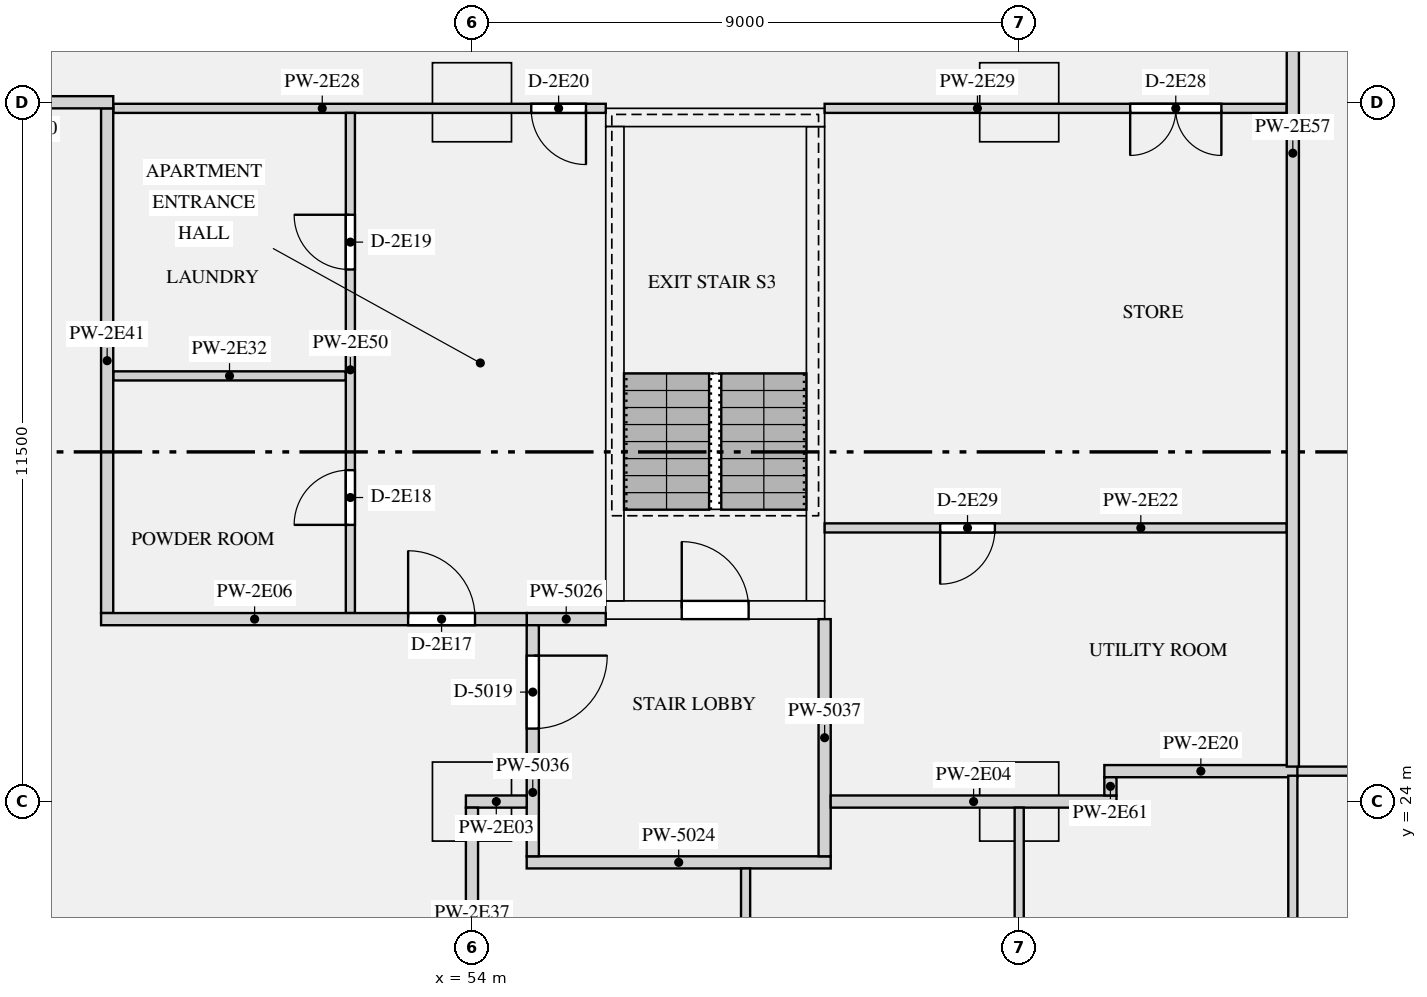
"""IFC4 building model, lengths in metres.
Left out: names, types, materials, properties, quantities, classifications, styles, units other than length and angle.
Written with IfcOpenShell. Run it as: python <this file> out.ifc"""

import sys

from ifc_helpers import new_model, si_unit, direction, frame, frame_2d, origin, origin_2d, place, context, subcontext, project, spatial, rectangle, extrude, element, fill, save


model = new_model("IFC4")
c1 = context("Model", 3, precision=1e-05, world=origin(), true_north=direction((0.0, 1.0)))
c2 = subcontext(c1, "Body", "Model", "MODEL_VIEW")
j1 = project(units=[si_unit("LENGTHUNIT", "METRE"), si_unit("PLANEANGLEUNIT", "RADIAN")], contexts=[c1])
p1 = place(None, origin())
s1 = spatial("IfcSite", under=j1, at=p1, CompositionType="ELEMENT")
p2 = place(p1, origin())
s2 = spatial("IfcBuilding", under=s1, at=p2, CompositionType="ELEMENT")
p3 = place(p2, frame((0.0, 0.0, 118.2)))
s3 = spatial("IfcBuildingStorey", under=s2, at=p3, CompositionType="ELEMENT", Elevation=118.2)
for number, where, z_axis, x_axis in (
    (1, (54.0, 24.0, 0.0), (0.0, 0.0, 1.0), (1.0, 0.0, 0.0)),
    (2, (63.0, 24.0, 0.0), (0.0, 0.0, 1.0), (1.0, 0.0, 0.0)),
    (3, (54.0, 35.5, 0.0), (0.0, 0.0, 1.0), (1.0, 0.0, 0.0)),
    (4, (63.0, 35.5, 0.0), (0.0, 0.0, 1.0), (1.0, 0.0, 0.0)),
):
    element("IfcColumn", number, at=place(p3, frame(where, z_axis=z_axis, x_axis=x_axis)), inside=s3, PredefinedType="COLUMN", context=c2, shape_type="SweptSolid", body=[
        extrude(rectangle(XDim=1.3, YDim=1.3, at=origin_2d()), origin(), (0.0, 0.0, 1.0), 3.15),
    ])
p4 = place(p3, frame((56.2, 27.15, 0.0), z_axis=(0.0, 0.0, 1.0), x_axis=(1.0, 0.0, 0.0)))
e5 = element("IfcWall", 5, at=p4, inside=s3, PredefinedType="SHEAR", context=c2, shape_type="SweptSolid", body=[
    extrude(rectangle(XDim=3.6, YDim=0.3, at=frame_2d((1.8, 0.0))), origin(), (0.0, 0.0, 1.0), 3.15),
])
p5 = place(p4, frame((1.25, 0.0, 0.0)))
e6 = element("IfcOpeningElement", 6, at=p5, cuts=e5, PredefinedType="OPENING", context=c2, shape_type="SweptSolid", body=[
    extrude(rectangle(XDim=1.1, YDim=2.1, at=frame_2d((0.55, 1.05))), frame((0.0, 0.16, 0.0), z_axis=(0.0, -1.0, 0.0), x_axis=(1.0, 0.0, 0.0)), (0.0, 0.0, 1.0), 0.32),
])
p6 = place(p3, frame((56.2, 35.25, 0.0), z_axis=(0.0, 0.0, 1.0), x_axis=(1.0, 0.0, 0.0)))
e7 = element("IfcWall", 7, at=p6, inside=s3, PredefinedType="SHEAR", context=c2, shape_type="SweptSolid", body=[
    extrude(rectangle(XDim=3.6, YDim=0.3, at=frame_2d((1.8, 0.0))), origin(), (0.0, 0.0, 1.0), 3.15),
])
for number, where, z_axis, x_axis in (
    (8, (56.35, 27.3, 0.0), (0.0, 0.0, 1.0), (0.0, 1.0, 0.0)),
    (9, (59.65, 27.3, 0.0), (0.0, 0.0, 1.0), (0.0, 1.0, 0.0)),
):
    element("IfcWall", number, at=place(p3, frame(where, z_axis=z_axis, x_axis=x_axis)), inside=s3, PredefinedType="SHEAR", context=c2, shape_type="SweptSolid", body=[
        extrude(rectangle(XDim=7.8, YDim=0.3, at=frame_2d((3.9, 0.0))), origin(), (0.0, 0.0, 1.0), 3.15),
    ])
p7 = place(p3, frame((54.9, 23.0, 0.0), z_axis=(0.0, 0.0, 1.0), x_axis=(1.0, 0.0, 0.0)))
e10 = element("IfcWall", 10, at=p7, inside=s3, PredefinedType="PARTITIONING", context=c2, shape_type="SweptSolid", body=[
    extrude(rectangle(XDim=5.0, YDim=0.2, at=frame_2d((2.5, 0.0))), origin(), (0.0, 0.0, 1.0), 2.83),
])
p8 = place(p3, frame((54.9, 27.0, 0.0), z_axis=(0.0, 0.0, 1.0), x_axis=(1.0, 0.0, 0.0)))
e11 = element("IfcWall", 11, at=p8, inside=s3, PredefinedType="PARTITIONING", context=c2, shape_type="SweptSolid", body=[
    extrude(rectangle(XDim=1.3, YDim=0.2, at=frame_2d((0.65, 0.0))), origin(), (0.0, 0.0, 1.0), 2.83),
])
p9 = place(p3, frame((55.0, 23.1, 0.0), z_axis=(0.0, 0.0, 1.0), x_axis=(0.0, 1.0, 0.0)))
e12 = element("IfcWall", 12, at=p9, inside=s3, PredefinedType="PARTITIONING", context=c2, shape_type="SweptSolid", body=[
    extrude(rectangle(XDim=3.8, YDim=0.2, at=frame_2d((1.9, 0.0))), origin(), (0.0, 0.0, 1.0), 2.83),
])
p10 = place(p9, frame((2.1, 0.0, 0.0)))
e13 = element("IfcOpeningElement", 13, at=p10, cuts=e12, PredefinedType="OPENING", context=c2, shape_type="SweptSolid", body=[
    extrude(rectangle(XDim=1.2, YDim=2.1, at=frame_2d((0.6, 1.05))), frame((0.0, 0.11, 0.0), z_axis=(0.0, -1.0, 0.0), x_axis=(1.0, 0.0, 0.0)), (0.0, 0.0, 1.0), 0.22),
])
p11 = place(p3, frame((59.8, 23.1, 0.0), z_axis=(0.0, 0.0, 1.0), x_axis=(0.0, 1.0, 0.0)))
e14 = element("IfcWall", 14, at=p11, inside=s3, PredefinedType="PARTITIONING", context=c2, shape_type="SweptSolid", body=[
    extrude(rectangle(XDim=3.9, YDim=0.2, at=frame_2d((1.95, 0.0))), origin(), (0.0, 0.0, 1.0), 2.83),
])
p12 = place(p3, frame((53.9, 24.0, 0.0), z_axis=(0.0, 0.0, 1.0), x_axis=(1.0, 0.0, 0.0)))
e15 = element("IfcWall", 15, at=p12, inside=s3, PredefinedType="PARTITIONING", context=c2, shape_type="SweptSolid", body=[
    extrude(rectangle(XDim=1.0, YDim=0.2, at=frame_2d((0.5, 0.0))), origin(), (0.0, 0.0, 1.0), 2.83),
])
p13 = place(p3, frame((59.9, 24.0, 0.0), z_axis=(0.0, 0.0, 1.0), x_axis=(1.0, 0.0, 0.0)))
e16 = element("IfcWall", 16, at=p13, inside=s3, PredefinedType="PARTITIONING", context=c2, shape_type="SweptSolid", body=[
    extrude(rectangle(XDim=4.7, YDim=0.2, at=frame_2d((2.35, 0.0))), origin(), (0.0, 0.0, 1.0), 2.83),
])
p14 = place(p3, frame((47.9, 27.0, 0.0), z_axis=(0.0, 0.0, 1.0), x_axis=(1.0, 0.0, 0.0)))
e17 = element("IfcWall", 17, at=p14, inside=s3, PredefinedType="PARTITIONING", context=c2, shape_type="SweptSolid", body=[
    extrude(rectangle(XDim=7.0, YDim=0.2, at=frame_2d((3.5, 0.0))), origin(), (0.0, 0.0, 1.0), 2.83),
])
p15 = place(p14, frame((5.05, 0.0, 0.0)))
e18 = element("IfcOpeningElement", 18, at=p15, cuts=e17, PredefinedType="OPENING", context=c2, shape_type="SweptSolid", body=[
    extrude(rectangle(XDim=1.1, YDim=2.1, at=frame_2d((0.55, 1.05))), frame((0.0, 0.11, 0.0), z_axis=(0.0, -1.0, 0.0), x_axis=(1.0, 0.0, 0.0)), (0.0, 0.0, 1.0), 0.22),
])
p16 = place(p3, frame((45.0, 35.5, 0.0), z_axis=(0.0, 0.0, 1.0), x_axis=(1.0, 0.0, 0.0)))
e19 = element("IfcWall", 19, at=p16, inside=s3, PredefinedType="PARTITIONING", context=c2, shape_type="SweptSolid", body=[
    extrude(rectangle(XDim=3.1, YDim=0.2, at=frame_2d((1.55, 0.0))), origin(), (0.0, 0.0, 1.0), 2.83),
])
p17 = place(p3, frame((67.425, 24.5, 0.0), z_axis=(0.0, 0.0, 1.0), x_axis=(1.0, 0.0, 0.0)))
e20 = element("IfcWall", 20, at=p17, inside=s3, PredefinedType="PARTITIONING", context=c2, shape_type="SweptSolid", body=[
    extrude(rectangle(XDim=4.65, YDim=0.15, at=frame_2d((2.325, 0.0))), origin(), (0.0, 0.0, 1.0), 2.83),
])
p18 = place(p17, frame((1.25, 0.0, 0.0)))
e21 = element("IfcOpeningElement", 21, at=p18, cuts=e20, PredefinedType="OPENING", context=c2, shape_type="SweptSolid", body=[
    extrude(rectangle(XDim=1.5, YDim=2.1, at=frame_2d((0.75, 1.05))), frame((0.0, 0.085, 0.0), z_axis=(0.0, -1.0, 0.0), x_axis=(1.0, 0.0, 0.0)), (0.0, 0.0, 1.0), 0.17),
])
p19 = place(p3, frame((64.4, 24.5, 0.0), z_axis=(0.0, 0.0, 1.0), x_axis=(1.0, 0.0, 0.0)))
e22 = element("IfcWall", 22, at=p19, inside=s3, PredefinedType="PARTITIONING", context=c2, shape_type="SweptSolid", body=[
    extrude(rectangle(XDim=3.175, YDim=0.2, at=frame_2d((1.587, 0.0))), origin(), (0.0, 0.0, 1.0), 2.83),
])
p20 = place(p3, frame((59.8, 28.5, 0.0), z_axis=(0.0, 0.0, 1.0), x_axis=(1.0, 0.0, 0.0)))
e23 = element("IfcWall", 23, at=p20, inside=s3, PredefinedType="PARTITIONING", context=c2, shape_type="SweptSolid", body=[
    extrude(rectangle(XDim=7.6, YDim=0.15, at=frame_2d((3.8, 0.0))), origin(), (0.0, 0.0, 1.0), 2.83),
])
p21 = place(p20, frame((1.9, 0.0, 0.0)))
e24 = element("IfcOpeningElement", 24, at=p21, cuts=e23, PredefinedType="OPENING", context=c2, shape_type="SweptSolid", body=[
    extrude(rectangle(XDim=0.9, YDim=2.1, at=frame_2d((0.45, 1.05))), frame((0.0, 0.085, 0.0), z_axis=(0.0, -1.0, 0.0), x_axis=(1.0, 0.0, 0.0)), (0.0, 0.0, 1.0), 0.17),
])
p22 = place(p3, frame((48.1, 35.4, 0.0), z_axis=(0.0, 0.0, 1.0), x_axis=(1.0, 0.0, 0.0)))
e25 = element("IfcWall", 25, at=p22, inside=s3, PredefinedType="PARTITIONING", context=c2, shape_type="SweptSolid", body=[
    extrude(rectangle(XDim=8.1, YDim=0.15, at=frame_2d((4.05, 0.0))), origin(), (0.0, 0.0, 1.0), 2.83),
])
p23 = place(p22, frame((6.875, 0.0, 0.0)))
e26 = element("IfcOpeningElement", 26, at=p23, cuts=e25, PredefinedType="OPENING", context=c2, shape_type="SweptSolid", body=[
    extrude(rectangle(XDim=0.9, YDim=2.1, at=frame_2d((0.45, 1.05))), frame((0.0, 0.085, 0.0), z_axis=(0.0, -1.0, 0.0), x_axis=(1.0, 0.0, 0.0)), (0.0, 0.0, 1.0), 0.17),
])
p24 = place(p3, frame((59.8, 35.4, 0.0), z_axis=(0.0, 0.0, 1.0), x_axis=(1.0, 0.0, 0.0)))
e27 = element("IfcWall", 27, at=p24, inside=s3, PredefinedType="PARTITIONING", context=c2, shape_type="SweptSolid", body=[
    extrude(rectangle(XDim=7.6, YDim=0.15, at=frame_2d((3.8, 0.0))), origin(), (0.0, 0.0, 1.0), 2.83),
])
p25 = place(p24, frame((5.025, 0.0, 0.0)))
e28 = element("IfcOpeningElement", 28, at=p25, cuts=e27, PredefinedType="OPENING", context=c2, shape_type="SweptSolid", body=[
    extrude(rectangle(XDim=1.5, YDim=2.1, at=frame_2d((0.75, 1.05))), frame((0.0, 0.085, 0.0), z_axis=(0.0, -1.0, 0.0), x_axis=(1.0, 0.0, 0.0)), (0.0, 0.0, 1.0), 0.17),
])
p26 = place(p3, frame((48.1, 31.0, 0.0), z_axis=(0.0, 0.0, 1.0), x_axis=(1.0, 0.0, 0.0)))
e29 = element("IfcWall", 29, at=p26, inside=s3, PredefinedType="PARTITIONING", context=c2, shape_type="SweptSolid", body=[
    extrude(rectangle(XDim=3.825, YDim=0.15, at=frame_2d((1.913, 0.0))), origin(), (0.0, 0.0, 1.0), 2.83),
])
p27 = place(p3, frame((54.0, 16.1, 0.0), z_axis=(0.0, 0.0, 1.0), x_axis=(0.0, 1.0, 0.0)))
e30 = element("IfcWall", 30, at=p27, inside=s3, PredefinedType="PARTITIONING", context=c2, shape_type="SweptSolid", body=[
    extrude(rectangle(XDim=7.8, YDim=0.2, at=frame_2d((3.9, 0.0))), origin(), (0.0, 0.0, 1.0), 2.83),
])
p28 = place(p27, frame((2.35, 0.0, 0.0)))
e31 = element("IfcOpeningElement", 31, at=p28, cuts=e30, PredefinedType="OPENING", context=c2, shape_type="SweptSolid", body=[
    extrude(rectangle(XDim=1.1, YDim=2.1, at=frame_2d((0.55, 1.05))), frame((0.0, 0.11, 0.0), z_axis=(0.0, -1.0, 0.0), x_axis=(1.0, 0.0, 0.0)), (0.0, 0.0, 1.0), 0.22),
])
p29 = place(p3, frame((48.0, 27.1, 0.0), z_axis=(0.0, 0.0, 1.0), x_axis=(0.0, 1.0, 0.0)))
e32 = element("IfcWall", 32, at=p29, inside=s3, PredefinedType="PARTITIONING", context=c2, shape_type="SweptSolid", body=[
    extrude(rectangle(XDim=8.3, YDim=0.2, at=frame_2d((4.15, 0.0))), origin(), (0.0, 0.0, 1.0), 2.83),
])
p30 = place(p3, frame((52.0, 27.1, 0.0), z_axis=(0.0, 0.0, 1.0), x_axis=(0.0, 1.0, 0.0)))
e33 = element("IfcWall", 33, at=p30, inside=s3, PredefinedType="PARTITIONING", context=c2, shape_type="SweptSolid", body=[
    extrude(rectangle(XDim=8.225, YDim=0.15, at=frame_2d((4.112, 0.0))), origin(), (0.0, 0.0, 1.0), 2.83),
])
p31 = place(p30, frame((1.45, 0.0, 0.0)))
e34 = element("IfcOpeningElement", 34, at=p31, cuts=e33, PredefinedType="OPENING", context=c2, shape_type="SweptSolid", body=[
    extrude(rectangle(XDim=0.9, YDim=2.1, at=frame_2d((0.45, 1.05))), frame((0.0, 0.085, 0.0), z_axis=(0.0, -1.0, 0.0), x_axis=(1.0, 0.0, 0.0)), (0.0, 0.0, 1.0), 0.17),
])
p32 = place(p30, frame((5.65, 0.0, 0.0)))
e35 = element("IfcOpeningElement", 35, at=p32, cuts=e33, PredefinedType="OPENING", context=c2, shape_type="SweptSolid", body=[
    extrude(rectangle(XDim=0.9, YDim=2.1, at=frame_2d((0.45, 1.05))), frame((0.0, 0.085, 0.0), z_axis=(0.0, -1.0, 0.0), x_axis=(1.0, 0.0, 0.0)), (0.0, 0.0, 1.0), 0.17),
])
p33 = place(p3, frame((67.5, 16.575, 0.0), z_axis=(0.0, 0.0, 1.0), x_axis=(0.0, 1.0, 0.0)))
e36 = element("IfcWall", 36, at=p33, inside=s3, PredefinedType="PARTITIONING", context=c2, shape_type="SweptSolid", body=[
    extrude(rectangle(XDim=7.85, YDim=0.15, at=frame_2d((3.925, 0.0))), origin(), (0.0, 0.0, 1.0), 2.83),
])
p34 = place(p3, frame((67.5, 24.575, 0.0), z_axis=(0.0, 0.0, 1.0), x_axis=(0.0, 1.0, 0.0)))
e37 = element("IfcWall", 37, at=p34, inside=s3, PredefinedType="PARTITIONING", context=c2, shape_type="SweptSolid", body=[
    extrude(rectangle(XDim=20.175, YDim=0.2, at=frame_2d((10.087, 0.0))), origin(), (0.0, 0.0, 1.0), 2.83),
])
p35 = place(p3, frame((63.0, 12.575, 0.0), z_axis=(0.0, 0.0, 1.0), x_axis=(0.0, 1.0, 0.0)))
e38 = element("IfcWall", 38, at=p35, inside=s3, PredefinedType="PARTITIONING", context=c2, shape_type="SweptSolid", body=[
    extrude(rectangle(XDim=11.325, YDim=0.15, at=frame_2d((5.663, 0.0))), origin(), (0.0, 0.0, 1.0), 2.83),
])
p36 = place(p35, frame((1.8, 0.0, 0.0)))
e39 = element("IfcOpeningElement", 39, at=p36, cuts=e38, PredefinedType="OPENING", context=c2, shape_type="SweptSolid", body=[
    extrude(rectangle(XDim=0.9, YDim=2.1, at=frame_2d((0.45, 1.05))), frame((0.0, 0.085, 0.0), z_axis=(0.0, -1.0, 0.0), x_axis=(1.0, 0.0, 0.0)), (0.0, 0.0, 1.0), 0.17),
])
p37 = place(p35, frame((6.9, 0.0, 0.0)))
e40 = element("IfcOpeningElement", 40, at=p37, cuts=e38, PredefinedType="OPENING", context=c2, shape_type="SweptSolid", body=[
    extrude(rectangle(XDim=0.9, YDim=2.1, at=frame_2d((0.45, 1.05))), frame((0.0, 0.085, 0.0), z_axis=(0.0, -1.0, 0.0), x_axis=(1.0, 0.0, 0.0)), (0.0, 0.0, 1.0), 0.17),
])
p38 = place(p3, frame((64.5, 24.1, 0.0), z_axis=(0.0, 0.0, 1.0), x_axis=(0.0, 1.0, 0.0)))
e41 = element("IfcWall", 41, at=p38, inside=s3, PredefinedType="PARTITIONING", context=c2, shape_type="SweptSolid", body=[
    extrude(rectangle(XDim=0.3, YDim=0.2, at=frame_2d((0.15, 0.0))), origin(), (0.0, 0.0, 1.0), 2.83),
])
p39 = place(p3, frame((58.5, 12.575, 0.0), z_axis=(0.0, 0.0, 1.0), x_axis=(0.0, 1.0, 0.0)))
e42 = element("IfcWall", 42, at=p39, inside=s3, PredefinedType="PARTITIONING", context=c2, shape_type="SweptSolid", body=[
    extrude(rectangle(XDim=10.325, YDim=0.15, at=frame_2d((5.163, 0.0))), origin(), (0.0, 0.0, 1.0), 2.83),
])
p40 = place(p39, frame((4.75, 0.0, 0.0)))
e43 = element("IfcOpeningElement", 43, at=p40, cuts=e42, PredefinedType="OPENING", context=c2, shape_type="SweptSolid", body=[
    extrude(rectangle(XDim=0.9, YDim=2.1, at=frame_2d((0.45, 1.05))), frame((0.0, 0.085, 0.0), z_axis=(0.0, -1.0, 0.0), x_axis=(1.0, 0.0, 0.0)), (0.0, 0.0, 1.0), 0.17),
])
p41 = place(p5, origin())
e44 = element("IfcDoor", 44, at=p41, inside=s3, OperationType="SINGLE_SWING_LEFT", PredefinedType="DOOR", context=c2, shape_type="SweptSolid", body=[
    extrude(rectangle(XDim=1.1, YDim=2.1, at=frame_2d((0.55, 1.05))), frame((0.0, 0.025, 0.0), z_axis=(0.0, -1.0, 0.0), x_axis=(1.0, 0.0, 0.0)), (0.0, 0.0, 1.0), 0.05),
])
fill(e6, e44)
p42 = place(p10, frame((1.2, 0.0, 0.0), z_axis=(0.0, 0.0, 1.0), x_axis=(-1.0, 0.0, 0.0)))
e45 = element("IfcDoor", 45, at=p42, inside=s3, OperationType="SINGLE_SWING_LEFT", PredefinedType="DOOR", context=c2, shape_type="SweptSolid", body=[
    extrude(rectangle(XDim=1.2, YDim=2.1, at=frame_2d((0.6, 1.05))), frame((0.0, 0.025, 0.0), z_axis=(0.0, -1.0, 0.0), x_axis=(1.0, 0.0, 0.0)), (0.0, 0.0, 1.0), 0.05),
])
fill(e13, e45)
p43 = place(p15, origin())
e46 = element("IfcDoor", 46, at=p43, inside=s3, OperationType="SINGLE_SWING_LEFT", PredefinedType="DOOR", context=c2, shape_type="SweptSolid", body=[
    extrude(rectangle(XDim=1.1, YDim=2.1, at=frame_2d((0.55, 1.05))), frame((0.0, 0.025, 0.0), z_axis=(0.0, -1.0, 0.0), x_axis=(1.0, 0.0, 0.0)), (0.0, 0.0, 1.0), 0.05),
])
fill(e18, e46)
p44 = place(p31, origin())
e47 = element("IfcDoor", 47, at=p44, inside=s3, OperationType="SINGLE_SWING_LEFT", PredefinedType="DOOR", context=c2, shape_type="SweptSolid", body=[
    extrude(rectangle(XDim=0.9, YDim=2.1, at=frame_2d((0.45, 1.05))), frame((0.0, 0.025, 0.0), z_axis=(0.0, -1.0, 0.0), x_axis=(1.0, 0.0, 0.0)), (0.0, 0.0, 1.0), 0.05),
])
fill(e34, e47)
p45 = place(p32, origin())
e48 = element("IfcDoor", 48, at=p45, inside=s3, OperationType="SINGLE_SWING_RIGHT", PredefinedType="DOOR", context=c2, shape_type="SweptSolid", body=[
    extrude(rectangle(XDim=0.9, YDim=2.1, at=frame_2d((0.45, 1.05))), frame((0.0, 0.025, 0.0), z_axis=(0.0, -1.0, 0.0), x_axis=(1.0, 0.0, 0.0)), (0.0, 0.0, 1.0), 0.05),
])
fill(e35, e48)
p46 = place(p23, frame((0.9, 0.0, 0.0), z_axis=(0.0, 0.0, 1.0), x_axis=(-1.0, 0.0, 0.0)))
e49 = element("IfcDoor", 49, at=p46, inside=s3, OperationType="SINGLE_SWING_LEFT", PredefinedType="DOOR", context=c2, shape_type="SweptSolid", body=[
    extrude(rectangle(XDim=0.9, YDim=2.1, at=frame_2d((0.45, 1.05))), frame((0.0, 0.025, 0.0), z_axis=(0.0, -1.0, 0.0), x_axis=(1.0, 0.0, 0.0)), (0.0, 0.0, 1.0), 0.05),
])
fill(e26, e49)
p47 = place(p25, frame((1.5, 0.0, 0.0), z_axis=(0.0, 0.0, 1.0), x_axis=(-1.0, 0.0, 0.0)))
e50 = element("IfcDoor", 50, at=p47, inside=s3, OperationType="DOUBLE_DOOR_SINGLE_SWING", PredefinedType="DOOR", context=c2, shape_type="SweptSolid", body=[
    extrude(rectangle(XDim=1.5, YDim=2.1, at=frame_2d((0.75, 1.05))), frame((0.0, 0.025, 0.0), z_axis=(0.0, -1.0, 0.0), x_axis=(1.0, 0.0, 0.0)), (0.0, 0.0, 1.0), 0.05),
])
fill(e28, e50)
p48 = place(p21, frame((0.9, 0.0, 0.0), z_axis=(0.0, 0.0, 1.0), x_axis=(-1.0, 0.0, 0.0)))
e51 = element("IfcDoor", 51, at=p48, inside=s3, OperationType="SINGLE_SWING_RIGHT", PredefinedType="DOOR", context=c2, shape_type="SweptSolid", body=[
    extrude(rectangle(XDim=0.9, YDim=2.1, at=frame_2d((0.45, 1.05))), frame((0.0, 0.025, 0.0), z_axis=(0.0, -1.0, 0.0), x_axis=(1.0, 0.0, 0.0)), (0.0, 0.0, 1.0), 0.05),
])
fill(e24, e51)
save(model, sys.argv[1])
